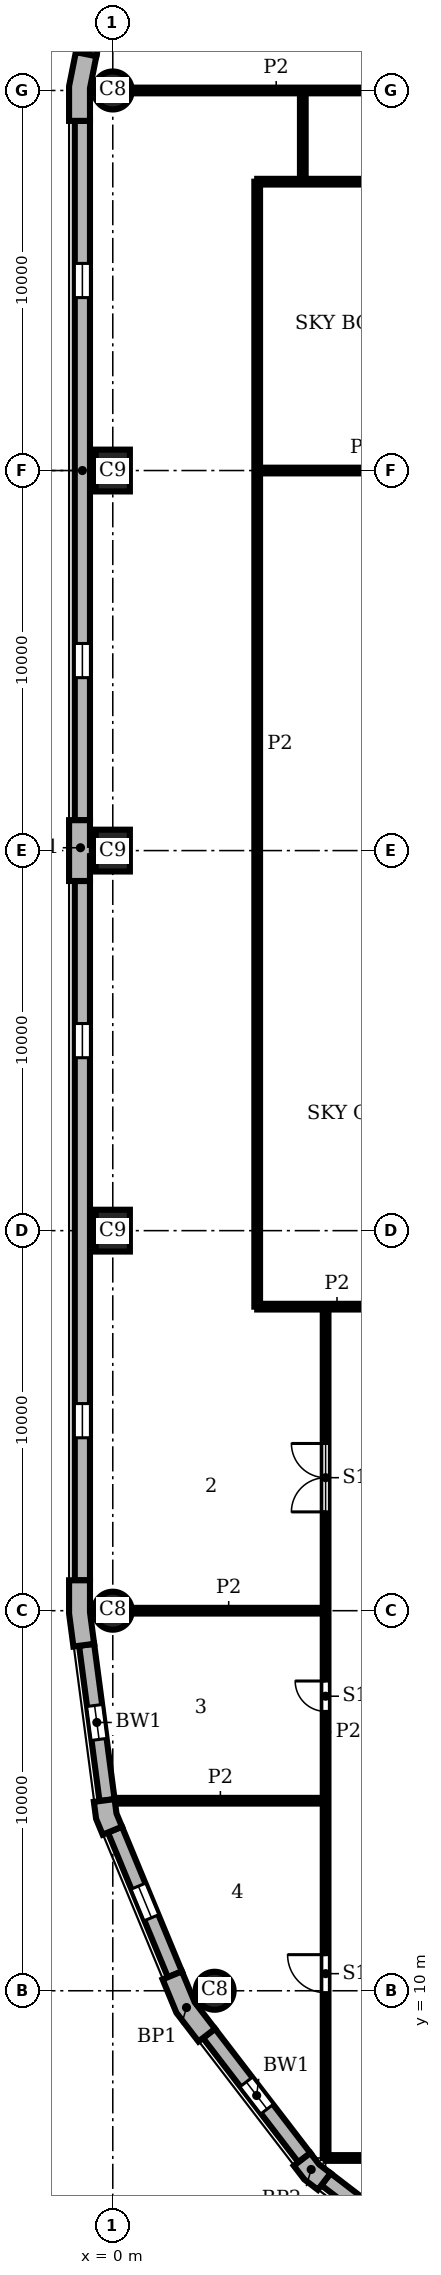
"""IFC4 building model, lengths in metres.
Left out: names, types, materials, properties, quantities, classifications, styles, units other than length and angle.
Written with IfcOpenShell. Run it as: python <this file> out.ifc"""

import sys

from ifc_helpers import new_model, si_unit, direction, frame, frame_2d, origin, origin_2d, place, context, subcontext, project, spatial, polyline, rectangle, circle, outline, extrude, element, fill, save


model = new_model("IFC4")
c1 = context("Model", 3, precision=1e-05, world=origin(), true_north=direction((0.0, 1.0)))
c2 = subcontext(c1, "Body", "Model", "MODEL_VIEW")
j1 = project(units=[si_unit("LENGTHUNIT", "METRE"), si_unit("PLANEANGLEUNIT", "RADIAN")], contexts=[c1])
p1 = place(None, origin())
s1 = spatial("IfcSite", under=j1, at=p1, CompositionType="ELEMENT")
p2 = place(p1, origin())
s2 = spatial("IfcBuilding", under=s1, at=p2, CompositionType="ELEMENT")
p3 = place(p2, frame((0.0, 0.0, 126.3)))
s3 = spatial("IfcBuildingStorey", under=s2, at=p3, CompositionType="ELEMENT", Elevation=126.3)
p4 = place(p3, frame((0.0, 60.0, 0.0), z_axis=(0.0, 0.0, 1.0), x_axis=(1.0, 0.0, 0.0)))
e1 = element("IfcColumn", 1, at=p4, inside=s3, PredefinedType="COLUMN", context=c2, shape_type="SweptSolid", body=[
    extrude(circle(Radius=0.5, at=origin_2d()), origin(), (0.0, 0.0, 1.0), 5.4),
])
for number, where, z_axis, x_axis in (
    (2, (0.0, 50.0, 0.0), (0.0, 0.0, 1.0), (0.0, 1.0, 0.0)),
    (3, (0.0, 40.0, 0.0), (0.0, 0.0, 1.0), (0.0, 1.0, 0.0)),
    (4, (0.0, 30.0, 0.0), (0.0, 0.0, 1.0), (0.0, 1.0, 0.0)),
):
    element("IfcColumn", number, at=place(p3, frame(where, z_axis=z_axis, x_axis=x_axis)), inside=s3, PredefinedType="COLUMN", context=c2, shape_type="SweptSolid", body=[
        extrude(rectangle(XDim=1.1, YDim=0.9, at=origin_2d()), origin(), (0.0, 0.0, 1.0), 5.4),
    ])
for number, where, z_axis, x_axis in (
    (5, (0.0, 20.0, 0.0), (0.0, 0.0, 1.0), (1.0, 0.0, 0.0)),
    (6, (2.679, 10.0, 0.0), (0.0, 0.0, 1.0), (1.0, 0.0, 0.0)),
):
    element("IfcColumn", number, at=place(p3, frame(where, z_axis=z_axis, x_axis=x_axis)), inside=s3, PredefinedType="COLUMN", context=c2, shape_type="SweptSolid", body=[
        extrude(circle(Radius=0.5, at=origin_2d()), origin(), (0.0, 0.0, 1.0), 5.4),
    ])
p5 = place(p3, origin())
e7 = element("IfcWall", 7, at=p5, inside=s3, PredefinedType="SOLIDWALL", context=c2, shape_type="SweptSolid", body=[
    extrude(outline(polyline([(-0.825, 60.98), (-0.972, 61.009), (-1.15, 60.113), (-1.15, 59.2), (-1.0, 59.2), (-0.6, 59.2), (-0.6, 60.059), (-0.432, 60.902), (-0.825, 60.98)])), origin(), (0.0, 0.0, 1.0), 5.4),
])
e8 = element("IfcWall", 8, at=p5, inside=s3, PredefinedType="SOLIDWALL", context=c2, shape_type="SweptSolid", body=[
    extrude(outline(polyline([(-0.6, 39.2), (-0.6, 39.85), (-0.55, 39.85), (-0.55, 40.15), (-0.6, 40.15), (-0.6, 40.8), (-1.0, 40.8), (-1.15, 40.8), (-1.15, 40.0), (-1.15, 39.2), (-1.0, 39.2), (-0.6, 39.2)])), origin(), (0.0, 0.0, 1.0), 5.4),
])
e9 = element("IfcWall", 9, at=p5, inside=s3, PredefinedType="SOLIDWALL", context=c2, shape_type="SweptSolid", body=[
    extrude(outline(polyline([(-1.0, 20.8), (-1.15, 20.8), (-1.15, 19.925), (-1.036, 19.057), (-0.887, 19.076), (-0.49, 19.128), (-0.6, 19.961), (-0.6, 20.8), (-1.0, 20.8)])), origin(), (0.0, 0.0, 1.0), 5.4),
])
e10 = element("IfcWall", 10, at=p5, inside=s3, PredefinedType="SOLIDWALL", context=c2, shape_type="SweptSolid", body=[
    extrude(outline(polyline([(-0.349, 14.99), (-0.498, 14.971), (-0.439, 14.523), (-0.266, 14.106), (-0.128, 14.164), (0.242, 14.317), (0.097, 14.667), (0.047, 15.043), (-0.349, 14.99)])), origin(), (0.0, 0.0, 1.0), 5.4),
])
e11 = element("IfcWall", 11, at=p5, inside=s3, PredefinedType="SOLIDWALL", context=c2, shape_type="SweptSolid", body=[
    extrude(outline(polyline([(1.449, 10.356), (1.311, 10.299), (1.675, 9.42), (2.254, 8.665), (2.373, 8.757), (2.69, 9.0), (2.155, 9.698), (1.819, 10.51), (1.449, 10.356)])), origin(), (0.0, 0.0, 1.0), 5.4),
])
e12 = element("IfcWall", 12, at=p5, inside=s3, PredefinedType="SOLIDWALL", context=c2, shape_type="SweptSolid", body=[
    extrude(outline(polyline([(4.882, 5.487), (4.763, 5.396), (5.038, 5.038), (5.396, 4.763), (5.487, 4.882), (5.731, 5.199), (5.43, 5.43), (5.199, 5.731), (4.882, 5.487)])), origin(), (0.0, 0.0, 1.0), 5.4),
])
p6 = place(p3, frame((0.299, 65.602, 0.0), z_axis=(0.0, 0.0, 1.0), x_axis=(-0.195098533057, -0.98078364709, 0.0)))
e13 = element("IfcWall", 13, at=p6, inside=s3, PredefinedType="SOLIDWALL", context=c2, shape_type="SweptSolid", body=[
    extrude(rectangle(XDim=4.753, YDim=0.4, at=frame_2d((2.376, 0.0))), origin(), (0.0, 0.0, 1.0), 5.4),
])
p7 = place(p6, frame((0.226, 0.0, 0.9)))
e14 = element("IfcOpeningElement", 14, at=p7, cuts=e13, PredefinedType="OPENING", context=c2, shape_type="SweptSolid", body=[
    extrude(rectangle(XDim=4.3, YDim=3.4, at=frame_2d((2.15, 1.7))), frame((0.0, 0.21, 0.0), z_axis=(0.0, -1.0, 0.0), x_axis=(1.0, 0.0, 0.0)), (0.0, 0.0, 1.0), 0.42),
])
p8 = place(p3, frame((-0.8, 59.2, 0.0), z_axis=(0.0, 0.0, 1.0), x_axis=(0.0, -1.0, 0.0)))
e15 = element("IfcWall", 15, at=p8, inside=s3, PredefinedType="SOLIDWALL", context=c2, shape_type="SweptSolid", body=[
    extrude(rectangle(XDim=18.4, YDim=0.4, at=frame_2d((9.2, 0.0))), origin(), (0.0, 0.0, 1.0), 5.4),
])
p9 = place(p8, frame((3.75, 0.0, 0.9)))
e16 = element("IfcOpeningElement", 16, at=p9, cuts=e15, PredefinedType="OPENING", context=c2, shape_type="SweptSolid", body=[
    extrude(rectangle(XDim=0.9, YDim=3.4, at=frame_2d((0.45, 1.7))), frame((0.0, 0.21, 0.0), z_axis=(0.0, -1.0, 0.0), x_axis=(1.0, 0.0, 0.0)), (0.0, 0.0, 1.0), 0.42),
])
p10 = place(p8, frame((13.75, 0.0, 0.9)))
e17 = element("IfcOpeningElement", 17, at=p10, cuts=e15, PredefinedType="OPENING", context=c2, shape_type="SweptSolid", body=[
    extrude(rectangle(XDim=0.9, YDim=3.4, at=frame_2d((0.45, 1.7))), frame((0.0, 0.21, 0.0), z_axis=(0.0, -1.0, 0.0), x_axis=(1.0, 0.0, 0.0)), (0.0, 0.0, 1.0), 0.42),
])
p11 = place(p3, frame((-0.8, 39.2, 0.0), z_axis=(0.0, 0.0, 1.0), x_axis=(0.0, -1.0, 0.0)))
e18 = element("IfcWall", 18, at=p11, inside=s3, PredefinedType="SOLIDWALL", context=c2, shape_type="SweptSolid", body=[
    extrude(rectangle(XDim=18.4, YDim=0.4, at=frame_2d((9.2, 0.0))), origin(), (0.0, 0.0, 1.0), 5.4),
])
p12 = place(p11, frame((3.75, 0.0, 0.9)))
e19 = element("IfcOpeningElement", 19, at=p12, cuts=e18, PredefinedType="OPENING", context=c2, shape_type="SweptSolid", body=[
    extrude(rectangle(XDim=0.9, YDim=3.4, at=frame_2d((0.45, 1.7))), frame((0.0, 0.21, 0.0), z_axis=(0.0, -1.0, 0.0), x_axis=(1.0, 0.0, 0.0)), (0.0, 0.0, 1.0), 0.42),
])
p13 = place(p11, frame((13.75, 0.0, 0.9)))
e20 = element("IfcOpeningElement", 20, at=p13, cuts=e18, PredefinedType="OPENING", context=c2, shape_type="SweptSolid", body=[
    extrude(rectangle(XDim=0.9, YDim=3.4, at=frame_2d((0.45, 1.7))), frame((0.0, 0.21, 0.0), z_axis=(0.0, -1.0, 0.0), x_axis=(1.0, 0.0, 0.0)), (0.0, 0.0, 1.0), 0.42),
])
p14 = place(p3, frame((-0.689, 19.102, 0.0), z_axis=(0.0, 0.0, 1.0), x_axis=(0.130514280502, -0.991446429508, 0.0)))
e21 = element("IfcWall", 21, at=p14, inside=s3, PredefinedType="SOLIDWALL", context=c2, shape_type="SweptSolid", body=[
    extrude(rectangle(XDim=4.121, YDim=0.4, at=frame_2d((2.061, 0.0))), origin(), (0.0, 0.0, 1.0), 5.4),
])
p15 = place(p14, frame((1.611, 0.0, 0.9)))
e22 = element("IfcOpeningElement", 22, at=p15, cuts=e21, PredefinedType="OPENING", context=c2, shape_type="SweptSolid", body=[
    extrude(rectangle(XDim=0.9, YDim=3.4, at=frame_2d((0.45, 1.7))), frame((0.0, 0.21, 0.0), z_axis=(0.0, -1.0, 0.0), x_axis=(1.0, 0.0, 0.0)), (0.0, 0.0, 1.0), 0.42),
])
p16 = place(p3, frame((0.057, 14.24, 0.0), z_axis=(0.0, 0.0, 1.0), x_axis=(0.382721546029, -0.923863744394, 0.0)))
e23 = element("IfcWall", 23, at=p16, inside=s3, PredefinedType="SOLIDWALL", context=c2, shape_type="SweptSolid", body=[
    extrude(rectangle(XDim=4.121, YDim=0.4, at=frame_2d((2.061, 0.0))), origin(), (0.0, 0.0, 1.0), 5.4),
])
p17 = place(p16, frame((1.611, 0.0, 0.9)))
e24 = element("IfcOpeningElement", 24, at=p17, cuts=e23, PredefinedType="OPENING", context=c2, shape_type="SweptSolid", body=[
    extrude(rectangle(XDim=0.9, YDim=3.4, at=frame_2d((0.45, 1.7))), frame((0.0, 0.21, 0.0), z_axis=(0.0, -1.0, 0.0), x_axis=(1.0, 0.0, 0.0)), (0.0, 0.0, 1.0), 0.42),
])
p18 = place(p3, frame((2.532, 8.878, 0.0), z_axis=(0.0, 0.0, 1.0), x_axis=(0.608759824817, -0.793354571229, 0.0)))
e25 = element("IfcWall", 25, at=p18, inside=s3, PredefinedType="SOLIDWALL", context=c2, shape_type="SweptSolid", body=[
    extrude(rectangle(XDim=4.121, YDim=0.4, at=frame_2d((2.061, 0.0))), origin(), (0.0, 0.0, 1.0), 5.4),
])
p19 = place(p18, frame((1.611, 0.0, 0.9)))
e26 = element("IfcOpeningElement", 26, at=p19, cuts=e25, PredefinedType="OPENING", context=c2, shape_type="SweptSolid", body=[
    extrude(rectangle(XDim=0.9, YDim=3.4, at=frame_2d((0.45, 1.7))), frame((0.0, 0.21, 0.0), z_axis=(0.0, -1.0, 0.0), x_axis=(1.0, 0.0, 0.0)), (0.0, 0.0, 1.0), 0.42),
])
p20 = place(p3, frame((5.609, 5.041, 0.0), z_axis=(0.0, 0.0, 1.0), x_axis=(0.793354571229, -0.608759824817, 0.0)))
e27 = element("IfcWall", 27, at=p20, inside=s3, PredefinedType="SOLIDWALL", context=c2, shape_type="SweptSolid", body=[
    extrude(rectangle(XDim=4.121, YDim=0.4, at=frame_2d((2.061, 0.0))), origin(), (0.0, 0.0, 1.0), 5.4),
])
p21 = place(p20, frame((1.611, 0.0, 0.9)))
e28 = element("IfcOpeningElement", 28, at=p21, cuts=e27, PredefinedType="OPENING", context=c2, shape_type="SweptSolid", body=[
    extrude(rectangle(XDim=0.9, YDim=3.4, at=frame_2d((0.45, 1.7))), frame((0.0, 0.21, 0.0), z_axis=(0.0, -1.0, 0.0), x_axis=(1.0, 0.0, 0.0)), (0.0, 0.0, 1.0), 0.42),
])
p22 = place(p3, frame((3.8, 28.0, 0.0), z_axis=(0.0, 0.0, 1.0), x_axis=(0.0, 1.0, 0.0)))
e29 = element("IfcWall", 29, at=p22, inside=s3, PredefinedType="PARTITIONING", context=c2, shape_type="SweptSolid", body=[
    extrude(rectangle(XDim=29.6, YDim=0.15, at=frame_2d((14.8, 0.0))), origin(), (0.0, 0.0, 1.0), 5.08),
])
p23 = place(p3, frame((5.0, 57.6, 0.0), z_axis=(0.0, 0.0, 1.0), x_axis=(0.0, 1.0, 0.0)))
e30 = element("IfcWall", 30, at=p23, inside=s3, PredefinedType="PARTITIONING", context=c2, shape_type="SweptSolid", body=[
    extrude(rectangle(XDim=2.4, YDim=0.15, at=frame_2d((1.2, 0.0))), origin(), (0.0, 0.0, 1.0), 5.08),
])
p24 = place(p3, frame((5.6, 5.6, 0.0), z_axis=(0.0, 0.0, 1.0), x_axis=(0.0, 1.0, 0.0)))
e31 = element("IfcWall", 31, at=p24, inside=s3, PredefinedType="PARTITIONING", context=c2, shape_type="SweptSolid", body=[
    extrude(rectangle(XDim=22.4, YDim=0.15, at=frame_2d((11.2, 0.0))), origin(), (0.0, 0.0, 1.0), 5.08),
])
p25 = place(p24, frame((4.35, 0.0, 0.0)))
e32 = element("IfcOpeningElement", 32, at=p25, cuts=e31, PredefinedType="OPENING", context=c2, shape_type="SweptSolid", body=[
    extrude(rectangle(XDim=1.0, YDim=2.1, at=frame_2d((0.5, 1.05))), frame((0.0, 0.085, 0.0), z_axis=(0.0, -1.0, 0.0), x_axis=(1.0, 0.0, 0.0)), (0.0, 0.0, 1.0), 0.17),
])
p26 = place(p24, frame((11.75, 0.0, 0.0)))
e33 = element("IfcOpeningElement", 33, at=p26, cuts=e31, PredefinedType="OPENING", context=c2, shape_type="SweptSolid", body=[
    extrude(rectangle(XDim=0.8, YDim=2.1, at=frame_2d((0.4, 1.05))), frame((0.0, 0.085, 0.0), z_axis=(0.0, -1.0, 0.0), x_axis=(1.0, 0.0, 0.0)), (0.0, 0.0, 1.0), 0.17),
])
p27 = place(p24, frame((17.0, 0.0, 0.0)))
e34 = element("IfcOpeningElement", 34, at=p27, cuts=e31, PredefinedType="OPENING", context=c2, shape_type="SweptSolid", body=[
    extrude(rectangle(XDim=1.8, YDim=2.1, at=frame_2d((0.9, 1.05))), frame((0.0, 0.085, 0.0), z_axis=(0.0, -1.0, 0.0), x_axis=(1.0, 0.0, 0.0)), (0.0, 0.0, 1.0), 0.17),
])
p28 = place(p3, frame((5.6, 5.6, 0.0), z_axis=(0.0, 0.0, 1.0), x_axis=(1.0, 0.0, 0.0)))
e35 = element("IfcWall", 35, at=p28, inside=s3, PredefinedType="PARTITIONING", context=c2, shape_type="SweptSolid", body=[
    extrude(rectangle(XDim=25.4, YDim=0.15, at=frame_2d((12.7, 0.0))), origin(), (0.0, 0.0, 1.0), 5.08),
])
p29 = place(p28, frame((4.1, 0.0, 0.0)))
e36 = element("IfcOpeningElement", 36, at=p29, cuts=e35, PredefinedType="OPENING", context=c2, shape_type="SweptSolid", body=[
    extrude(rectangle(XDim=0.8, YDim=2.1, at=frame_2d((0.4, 1.05))), frame((0.0, 0.085, 0.0), z_axis=(0.0, -1.0, 0.0), x_axis=(1.0, 0.0, 0.0)), (0.0, 0.0, 1.0), 0.17),
])
p30 = place(p28, frame((11.5, 0.0, 0.0)))
e37 = element("IfcOpeningElement", 37, at=p30, cuts=e35, PredefinedType="OPENING", context=c2, shape_type="SweptSolid", body=[
    extrude(rectangle(XDim=1.0, YDim=2.1, at=frame_2d((0.5, 1.05))), frame((0.0, 0.085, 0.0), z_axis=(0.0, -1.0, 0.0), x_axis=(1.0, 0.0, 0.0)), (0.0, 0.0, 1.0), 0.17),
])
p31 = place(p3, frame((0.063, 15.0, 0.0), z_axis=(0.0, 0.0, 1.0), x_axis=(1.0, 0.0, 0.0)))
e38 = element("IfcWall", 38, at=p31, inside=s3, PredefinedType="PARTITIONING", context=c2, shape_type="SweptSolid", body=[
    extrude(rectangle(XDim=5.537, YDim=0.15, at=frame_2d((2.769, 0.0))), origin(), (0.0, 0.0, 1.0), 5.08),
])
p32 = place(p3, frame((0.5, 20.0, 0.0), z_axis=(0.0, 0.0, 1.0), x_axis=(1.0, 0.0, 0.0)))
e39 = element("IfcWall", 39, at=p32, inside=s3, PredefinedType="PARTITIONING", context=c2, shape_type="SweptSolid", body=[
    extrude(rectangle(XDim=5.1, YDim=0.15, at=frame_2d((2.55, 0.0))), origin(), (0.0, 0.0, 1.0), 5.08),
])
p33 = place(p3, frame((3.8, 28.0, 0.0), z_axis=(0.0, 0.0, 1.0), x_axis=(1.0, 0.0, 0.0)))
e40 = element("IfcWall", 40, at=p33, inside=s3, PredefinedType="PARTITIONING", context=c2, shape_type="SweptSolid", body=[
    extrude(rectangle(XDim=4.2, YDim=0.15, at=frame_2d((2.1, 0.0))), origin(), (0.0, 0.0, 1.0), 5.08),
])
p34 = place(p3, frame((3.8, 50.0, 0.0), z_axis=(0.0, 0.0, 1.0), x_axis=(1.0, 0.0, 0.0)))
e41 = element("IfcWall", 41, at=p34, inside=s3, PredefinedType="PARTITIONING", context=c2, shape_type="SweptSolid", body=[
    extrude(rectangle(XDim=5.55, YDim=0.15, at=frame_2d((2.775, 0.0))), origin(), (0.0, 0.0, 1.0), 5.08),
])
p35 = place(p3, frame((3.8, 57.6, 0.0), z_axis=(0.0, 0.0, 1.0), x_axis=(1.0, 0.0, 0.0)))
e42 = element("IfcWall", 42, at=p35, inside=s3, PredefinedType="PARTITIONING", context=c2, shape_type="SweptSolid", body=[
    extrude(rectangle(XDim=10.0, YDim=0.15, at=frame_2d((5.0, 0.0))), origin(), (0.0, 0.0, 1.0), 5.08),
])
p36 = place(p35, frame((4.8, 0.0, 0.0)))
e43 = element("IfcOpeningElement", 43, at=p36, cuts=e42, PredefinedType="OPENING", context=c2, shape_type="SweptSolid", body=[
    extrude(rectangle(XDim=1.8, YDim=2.1, at=frame_2d((0.9, 1.05))), frame((0.0, 0.085, 0.0), z_axis=(0.0, -1.0, 0.0), x_axis=(1.0, 0.0, 0.0)), (0.0, 0.0, 1.0), 0.17),
])
p37 = place(p3, frame((0.5, 60.0, 0.0), z_axis=(0.0, 0.0, 1.0), x_axis=(1.0, 0.0, 0.0)))
e44 = element("IfcWall", 44, at=p37, inside=s3, PredefinedType="PARTITIONING", context=c2, shape_type="SweptSolid", body=[
    extrude(rectangle(XDim=7.6, YDim=0.15, at=frame_2d((3.8, 0.0))), origin(), (0.0, 0.0, 1.0), 5.08),
])
p38 = place(p9, origin())
e45 = element("IfcWindow", 45, at=p38, inside=s3, PartitioningType="SINGLE_PANEL", PredefinedType="WINDOW", context=c2, shape_type="SweptSolid", body=[
    extrude(rectangle(XDim=0.9, YDim=3.4, at=frame_2d((0.45, 1.7))), frame((0.0, 0.16, 0.0), z_axis=(0.0, -1.0, 0.0), x_axis=(1.0, 0.0, 0.0)), (0.0, 0.0, 1.0), 0.06),
])
fill(e16, e45)
p39 = place(p10, origin())
e46 = element("IfcWindow", 46, at=p39, inside=s3, PartitioningType="SINGLE_PANEL", PredefinedType="WINDOW", context=c2, shape_type="SweptSolid", body=[
    extrude(rectangle(XDim=0.9, YDim=3.4, at=frame_2d((0.45, 1.7))), frame((0.0, 0.16, 0.0), z_axis=(0.0, -1.0, 0.0), x_axis=(1.0, 0.0, 0.0)), (0.0, 0.0, 1.0), 0.06),
])
fill(e17, e46)
p40 = place(p12, origin())
e47 = element("IfcWindow", 47, at=p40, inside=s3, PartitioningType="SINGLE_PANEL", PredefinedType="WINDOW", context=c2, shape_type="SweptSolid", body=[
    extrude(rectangle(XDim=0.9, YDim=3.4, at=frame_2d((0.45, 1.7))), frame((0.0, 0.16, 0.0), z_axis=(0.0, -1.0, 0.0), x_axis=(1.0, 0.0, 0.0)), (0.0, 0.0, 1.0), 0.06),
])
fill(e19, e47)
p41 = place(p13, origin())
e48 = element("IfcWindow", 48, at=p41, inside=s3, PartitioningType="SINGLE_PANEL", PredefinedType="WINDOW", context=c2, shape_type="SweptSolid", body=[
    extrude(rectangle(XDim=0.9, YDim=3.4, at=frame_2d((0.45, 1.7))), frame((0.0, 0.16, 0.0), z_axis=(0.0, -1.0, 0.0), x_axis=(1.0, 0.0, 0.0)), (0.0, 0.0, 1.0), 0.06),
])
fill(e20, e48)
p42 = place(p15, origin())
e49 = element("IfcWindow", 49, at=p42, inside=s3, PartitioningType="SINGLE_PANEL", PredefinedType="WINDOW", context=c2, shape_type="SweptSolid", body=[
    extrude(rectangle(XDim=0.9, YDim=3.4, at=frame_2d((0.45, 1.7))), frame((0.0, 0.16, 0.0), z_axis=(0.0, -1.0, 0.0), x_axis=(1.0, 0.0, 0.0)), (0.0, 0.0, 1.0), 0.06),
])
fill(e22, e49)
p43 = place(p17, origin())
e50 = element("IfcWindow", 50, at=p43, inside=s3, PartitioningType="SINGLE_PANEL", PredefinedType="WINDOW", context=c2, shape_type="SweptSolid", body=[
    extrude(rectangle(XDim=0.9, YDim=3.4, at=frame_2d((0.45, 1.7))), frame((0.0, 0.16, 0.0), z_axis=(0.0, -1.0, 0.0), x_axis=(1.0, 0.0, 0.0)), (0.0, 0.0, 1.0), 0.06),
])
fill(e24, e50)
p44 = place(p19, origin())
e51 = element("IfcWindow", 51, at=p44, inside=s3, PartitioningType="SINGLE_PANEL", PredefinedType="WINDOW", context=c2, shape_type="SweptSolid", body=[
    extrude(rectangle(XDim=0.9, YDim=3.4, at=frame_2d((0.45, 1.7))), frame((0.0, 0.16, 0.0), z_axis=(0.0, -1.0, 0.0), x_axis=(1.0, 0.0, 0.0)), (0.0, 0.0, 1.0), 0.06),
])
fill(e26, e51)
p45 = place(p25, origin())
e52 = element("IfcDoor", 52, at=p45, inside=s3, OperationType="SINGLE_SWING_RIGHT", PredefinedType="DOOR", context=c2, shape_type="SweptSolid", body=[
    extrude(rectangle(XDim=1.0, YDim=2.1, at=frame_2d((0.5, 1.05))), frame((0.0, 0.025, 0.0), z_axis=(0.0, -1.0, 0.0), x_axis=(1.0, 0.0, 0.0)), (0.0, 0.0, 1.0), 0.05),
])
fill(e32, e52)
p46 = place(p26, origin())
e53 = element("IfcDoor", 53, at=p46, inside=s3, OperationType="SINGLE_SWING_RIGHT", PredefinedType="DOOR", context=c2, shape_type="SweptSolid", body=[
    extrude(rectangle(XDim=0.8, YDim=2.1, at=frame_2d((0.4, 1.05))), frame((0.0, 0.025, 0.0), z_axis=(0.0, -1.0, 0.0), x_axis=(1.0, 0.0, 0.0)), (0.0, 0.0, 1.0), 0.05),
])
fill(e33, e53)
p47 = place(p27, origin())
e54 = element("IfcDoor", 54, at=p47, inside=s3, OperationType="DOUBLE_DOOR_SINGLE_SWING", PredefinedType="DOOR", context=c2, shape_type="SweptSolid", body=[
    extrude(rectangle(XDim=1.8, YDim=2.1, at=frame_2d((0.9, 1.05))), frame((0.0, 0.025, 0.0), z_axis=(0.0, -1.0, 0.0), x_axis=(1.0, 0.0, 0.0)), (0.0, 0.0, 1.0), 0.05),
])
fill(e34, e54)
save(model, sys.argv[1])
